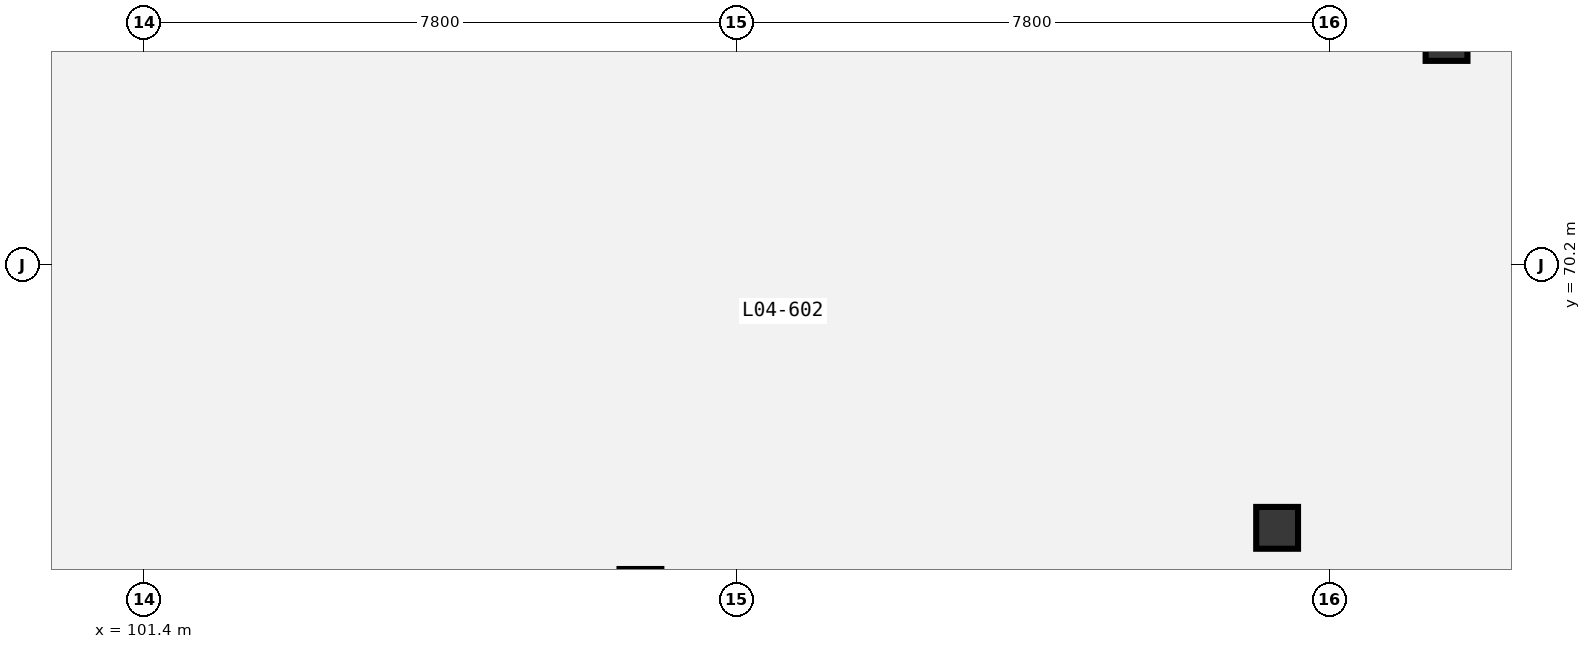
"""IFC4 building model, lengths in metres.
Left out: names, types, materials, properties, quantities, classifications, styles, units other than length and angle.
Written with IfcOpenShell. Run it as: python <this file> out.ifc"""

import sys

from ifc_helpers import new_model, si_unit, direction, frame, origin, origin_2d, place, context, subcontext, project, spatial, rectangle, extrude, element, save


model = new_model("IFC4")
c1 = context("Model", 3, precision=1e-05, world=origin(), true_north=direction((0.0, 1.0)))
c2 = subcontext(c1, "Body", "Model", "MODEL_VIEW")
j1 = project(units=[si_unit("LENGTHUNIT", "METRE"), si_unit("PLANEANGLEUNIT", "RADIAN")], contexts=[c1])
p1 = place(None, origin())
s1 = spatial("IfcSite", under=j1, at=p1, CompositionType="ELEMENT")
p2 = place(p1, origin())
s2 = spatial("IfcBuilding", under=s1, at=p2, CompositionType="ELEMENT")
p3 = place(p2, frame((0.0, 0.0, 19.8)))
s3 = spatial("IfcBuildingStorey", under=s2, at=p3, CompositionType="ELEMENT", Elevation=19.8)
for number, where, z_axis, x_axis in (
    (1, (107.928, 65.927, 0.0), (0.0, 0.0, 1.0), (1.0, 0.0, 0.0)),
    (2, (116.305, 66.743, 0.0), (0.0, 0.0, 1.0), (1.0, 0.0, 0.0)),
    (3, (118.534, 73.162, 0.0), (0.0, 0.0, 1.0), (1.0, 0.0, 0.0)),
):
    element("IfcColumn", number, at=place(p3, frame(where, z_axis=z_axis, x_axis=x_axis)), inside=s3, PredefinedType="COLUMN", context=c2, shape_type="SweptSolid", body=[
        extrude(rectangle(XDim=0.55, YDim=0.55, at=origin_2d()), origin(), (0.0, 0.0, 1.0), 4.5),
    ])
save(model, sys.argv[1])
